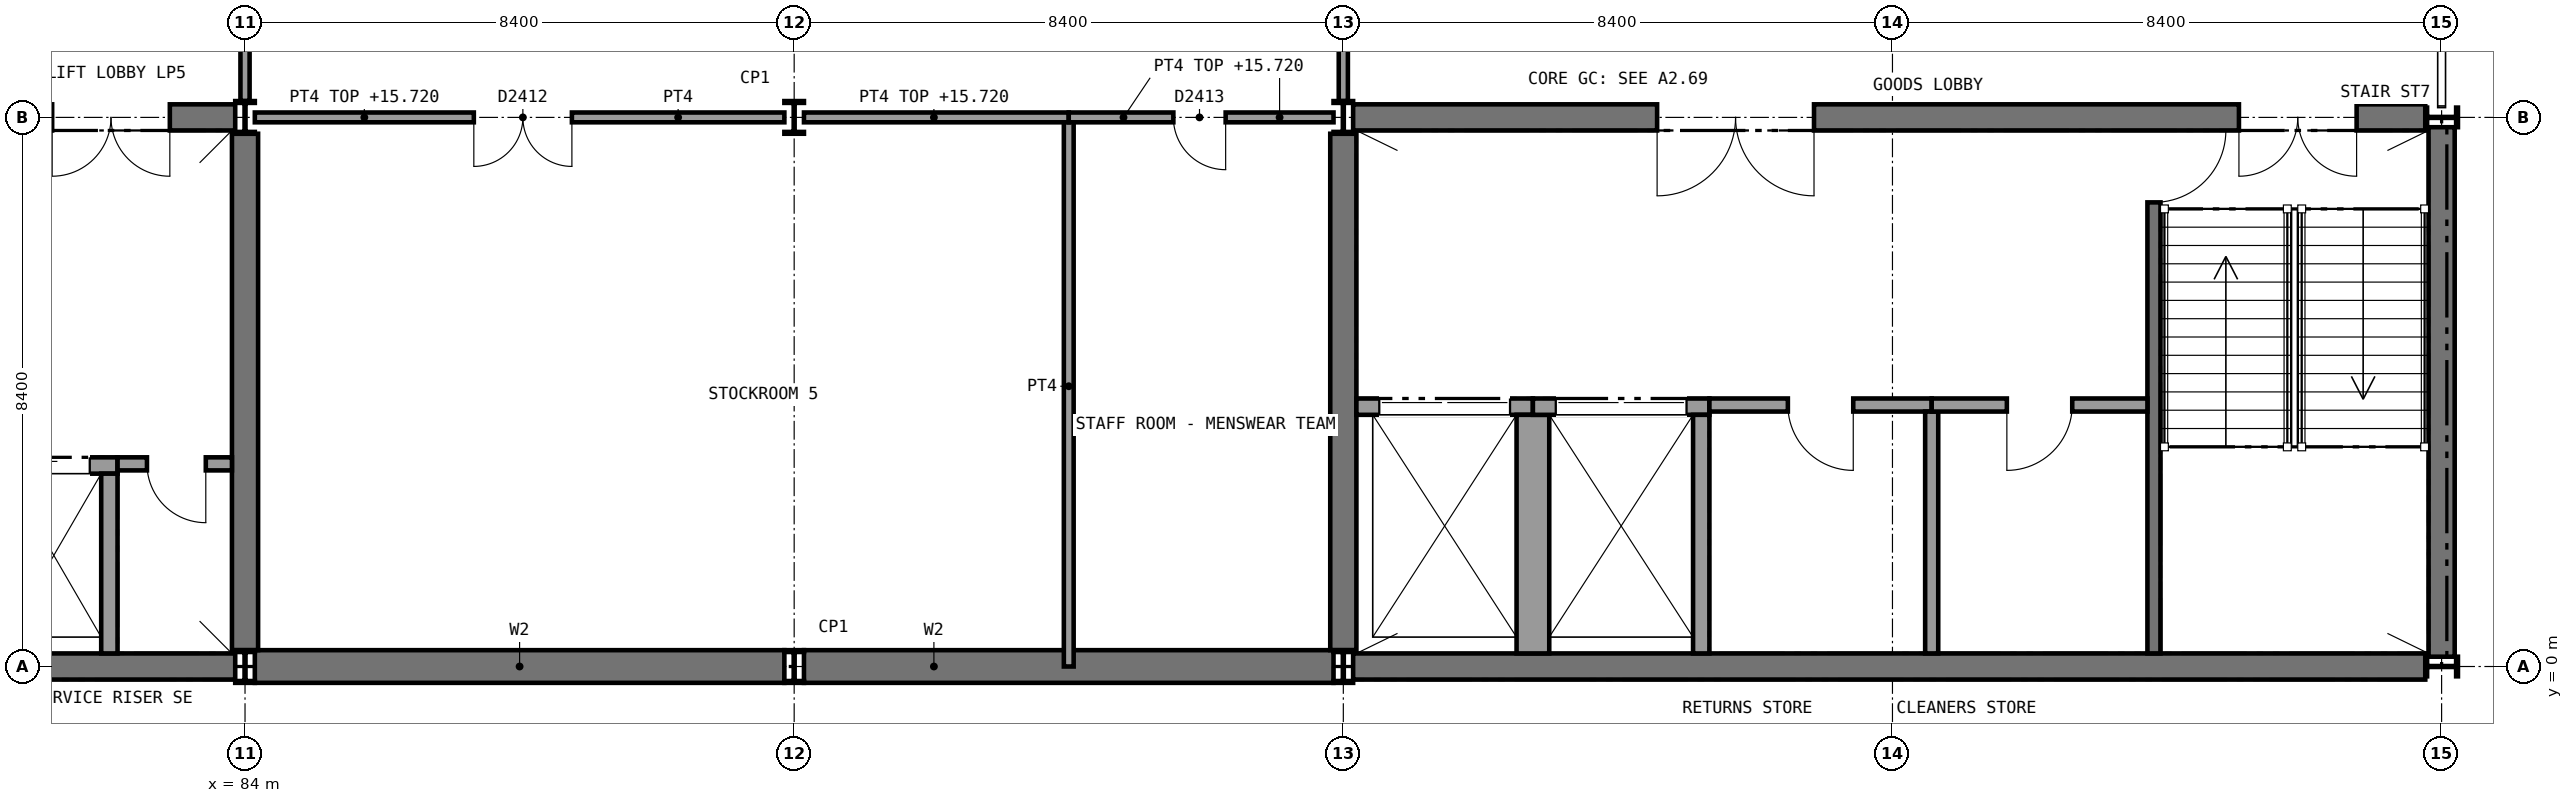
"""IFC4 building model, lengths in metres.
Left out: names, types, materials, properties, quantities, classifications, styles, units other than length and angle.
Written with IfcOpenShell. Run it as: python <this file> out.ifc"""

import sys

from ifc_helpers import new_model, si_unit, direction, frame, frame_2d, origin, origin_2d, place, context, subcontext, project, spatial, rectangle, i_section, extrude, element, fill, save


model = new_model("IFC4")
c1 = context("Model", 3, precision=1e-05, world=origin(), true_north=direction((0.0, 1.0)))
c2 = subcontext(c1, "Body", "Model", "MODEL_VIEW")
j1 = project(units=[si_unit("LENGTHUNIT", "METRE"), si_unit("PLANEANGLEUNIT", "RADIAN")], contexts=[c1])
p1 = place(None, origin())
s1 = spatial("IfcSite", under=j1, at=p1, CompositionType="ELEMENT")
p2 = place(p1, origin())
s2 = spatial("IfcBuilding", under=s1, at=p2, CompositionType="ELEMENT")
p3 = place(p2, frame((0.0, 0.0, 11.4)))
s3 = spatial("IfcBuildingStorey", under=s2, at=p3, CompositionType="ELEMENT", Elevation=11.4)
p4 = place(p3, frame((84.15, 0.0, 0.0), z_axis=(0.0, 0.0, 1.0), x_axis=(1.0, 0.0, 0.0)))
e1 = element("IfcWall", 1, at=p4, inside=s3, PredefinedType="SHEAR", context=c2, shape_type="SweptSolid", body=[
    extrude(rectangle(XDim=8.1, YDim=0.5, at=frame_2d((4.05, 0.0))), origin(), (0.0, 0.0, 1.0), 4.65),
])
p5 = place(p3, frame((92.55, 0.0, 0.0), z_axis=(0.0, 0.0, 1.0), x_axis=(1.0, 0.0, 0.0)))
e2 = element("IfcWall", 2, at=p5, inside=s3, PredefinedType="SHEAR", context=c2, shape_type="SweptSolid", body=[
    extrude(rectangle(XDim=8.1, YDim=0.5, at=frame_2d((4.05, 0.0))), origin(), (0.0, 0.0, 1.0), 4.65),
])
p6 = place(p3, frame((75.75, 0.0, 0.0), z_axis=(0.0, 0.0, 1.0), x_axis=(1.0, 0.0, 0.0)))
e3 = element("IfcWall", 3, at=p6, inside=s3, PredefinedType="SHEAR", context=c2, shape_type="SweptSolid", body=[
    extrude(rectangle(XDim=8.1, YDim=0.4, at=frame_2d((4.05, 0.0))), origin(), (0.0, 0.0, 1.0), 4.65),
])
p7 = place(p3, frame((75.75, 8.4, 0.0), z_axis=(0.0, 0.0, 1.0), x_axis=(1.0, 0.0, 0.0)))
e4 = element("IfcWall", 4, at=p7, inside=s3, PredefinedType="SHEAR", context=c2, shape_type="SweptSolid", body=[
    extrude(rectangle(XDim=8.1, YDim=0.4, at=frame_2d((4.05, 0.0))), origin(), (0.0, 0.0, 1.0), 4.65),
])
p8 = place(p7, frame((1.15, 0.0, 0.0)))
e5 = element("IfcOpeningElement", 5, at=p8, cuts=e4, PredefinedType="OPENING", context=c2, shape_type="SweptSolid", body=[
    extrude(rectangle(XDim=1.8, YDim=2.1, at=frame_2d((0.9, 1.05))), frame((0.0, 0.21, 0.0), z_axis=(0.0, -1.0, 0.0), x_axis=(1.0, 0.0, 0.0)), (0.0, 0.0, 1.0), 0.42),
])
p9 = place(p7, frame((5.3, 0.0, 0.0)))
e6 = element("IfcOpeningElement", 6, at=p9, cuts=e4, PredefinedType="OPENING", context=c2, shape_type="SweptSolid", body=[
    extrude(rectangle(XDim=1.8, YDim=2.1, at=frame_2d((0.9, 1.05))), frame((0.0, 0.21, 0.0), z_axis=(0.0, -1.0, 0.0), x_axis=(1.0, 0.0, 0.0)), (0.0, 0.0, 1.0), 0.42),
])
p10 = place(p3, frame((84.0, 0.25, 0.0), z_axis=(0.0, 0.0, 1.0), x_axis=(0.0, 1.0, 0.0)))
e7 = element("IfcWall", 7, at=p10, inside=s3, PredefinedType="SHEAR", context=c2, shape_type="SweptSolid", body=[
    extrude(rectangle(XDim=7.9, YDim=0.4, at=frame_2d((3.95, 0.0))), origin(), (0.0, 0.0, 1.0), 4.65),
])
p11 = place(p3, frame((100.95, 0.0, 0.0), z_axis=(0.0, 0.0, 1.0), x_axis=(1.0, 0.0, 0.0)))
e8 = element("IfcWall", 8, at=p11, inside=s3, PredefinedType="SHEAR", context=c2, shape_type="SweptSolid", body=[
    extrude(rectangle(XDim=16.4, YDim=0.4, at=frame_2d((8.2, 0.0))), origin(), (0.0, 0.0, 1.0), 4.65),
])
p12 = place(p3, frame((100.95, 8.4, 0.0), z_axis=(0.0, 0.0, 1.0), x_axis=(1.0, 0.0, 0.0)))
e9 = element("IfcWall", 9, at=p12, inside=s3, PredefinedType="SHEAR", context=c2, shape_type="SweptSolid", body=[
    extrude(rectangle(XDim=16.4, YDim=0.4, at=frame_2d((8.2, 0.0))), origin(), (0.0, 0.0, 1.0), 4.65),
])
p13 = place(p12, frame((13.55, 0.0, 0.0)))
e10 = element("IfcOpeningElement", 10, at=p13, cuts=e9, PredefinedType="OPENING", context=c2, shape_type="SweptSolid", body=[
    extrude(rectangle(XDim=1.8, YDim=2.1, at=frame_2d((0.9, 1.05))), frame((0.0, 0.21, 0.0), z_axis=(0.0, -1.0, 0.0), x_axis=(1.0, 0.0, 0.0)), (0.0, 0.0, 1.0), 0.42),
])
p14 = place(p12, frame((4.65, 0.0, 0.0)))
e11 = element("IfcOpeningElement", 11, at=p14, cuts=e9, PredefinedType="OPENING", context=c2, shape_type="SweptSolid", body=[
    extrude(rectangle(XDim=2.4, YDim=2.4, at=frame_2d((1.2, 1.2))), frame((0.0, 0.21, 0.0), z_axis=(0.0, -1.0, 0.0), x_axis=(1.0, 0.0, 0.0)), (0.0, 0.0, 1.0), 0.42),
])
p15 = place(p3, frame((100.8, 0.25, 0.0), z_axis=(0.0, 0.0, 1.0), x_axis=(0.0, 1.0, 0.0)))
e12 = element("IfcWall", 12, at=p15, inside=s3, PredefinedType="SHEAR", context=c2, shape_type="SweptSolid", body=[
    extrude(rectangle(XDim=7.9, YDim=0.4, at=frame_2d((3.95, 0.0))), origin(), (0.0, 0.0, 1.0), 4.65),
])
p16 = place(p3, frame((117.6, 0.15, 0.0), z_axis=(0.0, 0.0, 1.0), x_axis=(0.0, 1.0, 0.0)))
e13 = element("IfcWall", 13, at=p16, inside=s3, PredefinedType="SHEAR", context=c2, shape_type="SweptSolid", body=[
    extrude(rectangle(XDim=8.1, YDim=0.4, at=frame_2d((4.05, 0.0))), origin(), (0.0, 0.0, 1.0), 4.65),
])
for number, where, z_axis, x_axis in (
    (14, (84.0, 0.0, 0.0), (0.0, 0.0, 1.0), (1.0, 0.0, 0.0)),
    (15, (84.0, 8.4, 0.0), (0.0, 0.0, 1.0), (1.0, 0.0, 0.0)),
    (16, (92.4, 0.0, 0.0), (0.0, 0.0, 1.0), (1.0, 0.0, 0.0)),
    (17, (92.4, 8.4, 0.0), (0.0, 0.0, 1.0), (1.0, 0.0, 0.0)),
    (18, (100.8, 0.0, 0.0), (0.0, 0.0, 1.0), (1.0, 0.0, 0.0)),
    (19, (100.8, 8.4, 0.0), (0.0, 0.0, 1.0), (1.0, 0.0, 0.0)),
    (20, (117.6, 0.0, 0.0), (0.0, 0.0, 1.0), (0.0, 1.0, 0.0)),
    (21, (117.6, 8.4, 0.0), (0.0, 0.0, 1.0), (0.0, 1.0, 0.0)),
):
    element("IfcColumn", number, at=place(p3, frame(where, z_axis=z_axis, x_axis=x_axis)), inside=s3, PredefinedType="COLUMN", context=c2, shape_type="SweptSolid", body=[
        extrude(i_section(OverallWidth=0.3, OverallDepth=0.5, WebThickness=0.014, FlangeThickness=0.028, FilletRadius=0.027, at=origin_2d()), origin(), (0.0, 0.0, 1.0), 4.8),
    ])
p17 = place(p3, frame((96.6, 0.0, 0.0), z_axis=(0.0, 0.0, 1.0), x_axis=(0.0, 1.0, 0.0)))
e22 = element("IfcWall", 22, at=p17, inside=s3, PredefinedType="SOLIDWALL", context=c2, shape_type="SweptSolid", body=[
    extrude(rectangle(XDim=8.4, YDim=0.15, at=frame_2d((4.2, 0.0))), origin(), (0.0, 0.0, 1.0), 4.65),
])
p18 = place(p3, frame((84.15, 8.4, 0.0), z_axis=(0.0, 0.0, 1.0), x_axis=(1.0, 0.0, 0.0)))
e23 = element("IfcWall", 23, at=p18, inside=s3, PredefinedType="SOLIDWALL", context=c2, shape_type="SweptSolid", body=[
    extrude(rectangle(XDim=8.1, YDim=0.15, at=frame_2d((4.05, 0.0))), origin(), (0.0, 0.0, 1.0), 4.32),
])
p19 = place(p18, frame((3.35, 0.0, 0.0)))
e24 = element("IfcOpeningElement", 24, at=p19, cuts=e23, PredefinedType="OPENING", context=c2, shape_type="SweptSolid", body=[
    extrude(rectangle(XDim=1.5, YDim=2.1, at=frame_2d((0.75, 1.05))), frame((0.0, 0.085, 0.0), z_axis=(0.0, -1.0, 0.0), x_axis=(1.0, 0.0, 0.0)), (0.0, 0.0, 1.0), 0.17),
])
p20 = place(p3, frame((92.55, 8.4, 0.0), z_axis=(0.0, 0.0, 1.0), x_axis=(1.0, 0.0, 0.0)))
e25 = element("IfcWall", 25, at=p20, inside=s3, PredefinedType="SOLIDWALL", context=c2, shape_type="SweptSolid", body=[
    extrude(rectangle(XDim=4.05, YDim=0.15, at=frame_2d((2.025, 0.0))), origin(), (0.0, 0.0, 1.0), 4.32),
])
p21 = place(p3, frame((96.6, 8.4, 0.0), z_axis=(0.0, 0.0, 1.0), x_axis=(1.0, 0.0, 0.0)))
e26 = element("IfcWall", 26, at=p21, inside=s3, PredefinedType="SOLIDWALL", context=c2, shape_type="SweptSolid", body=[
    extrude(rectangle(XDim=4.05, YDim=0.15, at=frame_2d((2.025, 0.0))), origin(), (0.0, 0.0, 1.0), 4.32),
])
p22 = place(p21, frame((1.6, 0.0, 0.0)))
e27 = element("IfcOpeningElement", 27, at=p22, cuts=e26, PredefinedType="OPENING", context=c2, shape_type="SweptSolid", body=[
    extrude(rectangle(XDim=0.8, YDim=2.1, at=frame_2d((0.4, 1.05))), frame((0.0, 0.085, 0.0), z_axis=(0.0, -1.0, 0.0), x_axis=(1.0, 0.0, 0.0)), (0.0, 0.0, 1.0), 0.17),
])
for number, where, z_axis, x_axis in (
    (28, (84.0, 8.65, 0.0), (0.0, 0.0, 1.0), (0.0, 1.0, 0.0)),
    (29, (100.8, 8.65, 0.0), (0.0, 0.0, 1.0), (0.0, 1.0, 0.0)),
):
    element("IfcWall", number, at=place(p3, frame(where, z_axis=z_axis, x_axis=x_axis)), inside=s3, PredefinedType="PARTITIONING", context=c2, shape_type="SweptSolid", body=[
        extrude(rectangle(XDim=3.1, YDim=0.14, at=frame_2d((1.55, 0.0))), origin(), (0.0, 0.0, 1.0), 4.21),
    ])
p23 = place(p3, frame((80.1, 3.075, 0.0), z_axis=(0.0, 0.0, 1.0), x_axis=(1.0, 0.0, 0.0)))
e30 = element("IfcWall", 30, at=p23, inside=s3, PredefinedType="SOLIDWALL", context=c2, shape_type="SweptSolid", body=[
    extrude(rectangle(XDim=1.95, YDim=0.25, at=frame_2d((0.975, 0.0))), origin(), (0.0, 0.0, 1.0), 4.8),
])
p24 = place(p23, frame((0.425, 0.0, 0.0)))
e31 = element("IfcOpeningElement", 31, at=p24, cuts=e30, PredefinedType="OPENING", context=c2, shape_type="SweptSolid", body=[
    extrude(rectangle(XDim=1.1, YDim=2.1, at=frame_2d((0.55, 1.05))), frame((0.0, 0.135, 0.0), z_axis=(0.0, -1.0, 0.0), x_axis=(1.0, 0.0, 0.0)), (0.0, 0.0, 1.0), 0.27),
])
p25 = place(p3, frame((81.925, 0.2, 0.0), z_axis=(0.0, 0.0, 1.0), x_axis=(0.0, 1.0, 0.0)))
e32 = element("IfcWall", 32, at=p25, inside=s3, PredefinedType="SOLIDWALL", context=c2, shape_type="SweptSolid", body=[
    extrude(rectangle(XDim=2.75, YDim=0.25, at=frame_2d((1.375, 0.0))), origin(), (0.0, 0.0, 1.0), 4.8),
])
p26 = place(p3, frame((82.05, 3.1, 0.0), z_axis=(0.0, 0.0, 1.0), x_axis=(1.0, 0.0, 0.0)))
e33 = element("IfcWall", 33, at=p26, inside=s3, PredefinedType="PARTITIONING", context=c2, shape_type="SweptSolid", body=[
    extrude(rectangle(XDim=1.75, YDim=0.2, at=frame_2d((0.875, 0.0))), origin(), (0.0, 0.0, 1.0), 4.65),
])
p27 = place(p26, frame((0.45, 0.0, 0.0)))
e34 = element("IfcOpeningElement", 34, at=p27, cuts=e33, PredefinedType="OPENING", context=c2, shape_type="SweptSolid", body=[
    extrude(rectangle(XDim=0.9, YDim=2.1, at=frame_2d((0.45, 1.05))), frame((0.0, 0.11, 0.0), z_axis=(0.0, -1.0, 0.0), x_axis=(1.0, 0.0, 0.0)), (0.0, 0.0, 1.0), 0.22),
])
p28 = place(p3, frame((113.2, 0.2, 0.0), z_axis=(0.0, 0.0, 1.0), x_axis=(0.0, 1.0, 0.0)))
e35 = element("IfcWall", 35, at=p28, inside=s3, PredefinedType="SHEAR", context=c2, shape_type="SweptSolid", body=[
    extrude(rectangle(XDim=8.0, YDim=0.2, at=frame_2d((4.0, 0.0))), origin(), (0.0, 0.0, 1.0), 4.65),
])
p29 = place(p28, frame((6.9, 0.0, 0.0)))
e36 = element("IfcOpeningElement", 36, at=p29, cuts=e35, PredefinedType="OPENING", context=c2, shape_type="SweptSolid", body=[
    extrude(rectangle(XDim=1.11, YDim=2.1, at=frame_2d((0.555, 1.05))), frame((0.0, 0.11, 0.0), z_axis=(0.0, -1.0, 0.0), x_axis=(1.0, 0.0, 0.0)), (0.0, 0.0, 1.0), 0.22),
])
p30 = place(p3, frame((101.0, 3.975, 0.0), z_axis=(0.0, 0.0, 1.0), x_axis=(1.0, 0.0, 0.0)))
e37 = element("IfcWall", 37, at=p30, inside=s3, PredefinedType="SOLIDWALL", context=c2, shape_type="SweptSolid", body=[
    extrude(rectangle(XDim=2.7, YDim=0.25, at=frame_2d((1.35, 0.0))), origin(), (0.0, 0.0, 1.0), 4.8),
])
p31 = place(p30, frame((0.35, 0.0, 0.0)))
e38 = element("IfcOpeningElement", 38, at=p31, cuts=e37, PredefinedType="OPENING", context=c2, shape_type="SweptSolid", body=[
    extrude(rectangle(XDim=2.0, YDim=2.2, at=frame_2d((1.0, 1.1))), frame((0.0, 0.135, 0.0), z_axis=(0.0, -1.0, 0.0), x_axis=(1.0, 0.0, 0.0)), (0.0, 0.0, 1.0), 0.27),
])
p32 = place(p3, frame((103.7, 0.2, 0.0), z_axis=(0.0, 0.0, 1.0), x_axis=(0.0, 1.0, 0.0)))
e39 = element("IfcWall", 39, at=p32, inside=s3, PredefinedType="SOLIDWALL", context=c2, shape_type="SweptSolid", body=[
    extrude(rectangle(XDim=3.65, YDim=0.5, at=frame_2d((1.825, 0.0))), origin(), (0.0, 0.0, 1.0), 4.8),
])
p33 = place(p3, frame((103.7, 3.975, 0.0), z_axis=(0.0, 0.0, 1.0), x_axis=(1.0, 0.0, 0.0)))
e40 = element("IfcWall", 40, at=p33, inside=s3, PredefinedType="SOLIDWALL", context=c2, shape_type="SweptSolid", body=[
    extrude(rectangle(XDim=2.7, YDim=0.25, at=frame_2d((1.35, 0.0))), origin(), (0.0, 0.0, 1.0), 4.8),
])
p34 = place(p33, frame((0.35, 0.0, 0.0)))
e41 = element("IfcOpeningElement", 41, at=p34, cuts=e40, PredefinedType="OPENING", context=c2, shape_type="SweptSolid", body=[
    extrude(rectangle(XDim=2.0, YDim=2.2, at=frame_2d((1.0, 1.1))), frame((0.0, 0.135, 0.0), z_axis=(0.0, -1.0, 0.0), x_axis=(1.0, 0.0, 0.0)), (0.0, 0.0, 1.0), 0.27),
])
p35 = place(p3, frame((106.275, 0.2, 0.0), z_axis=(0.0, 0.0, 1.0), x_axis=(0.0, 1.0, 0.0)))
e42 = element("IfcWall", 42, at=p35, inside=s3, PredefinedType="SOLIDWALL", context=c2, shape_type="SweptSolid", body=[
    extrude(rectangle(XDim=3.65, YDim=0.25, at=frame_2d((1.825, 0.0))), origin(), (0.0, 0.0, 1.0), 4.8),
])
p36 = place(p3, frame((106.4, 4.0, 0.0), z_axis=(0.0, 0.0, 1.0), x_axis=(1.0, 0.0, 0.0)))
e43 = element("IfcWall", 43, at=p36, inside=s3, PredefinedType="PARTITIONING", context=c2, shape_type="SweptSolid", body=[
    extrude(rectangle(XDim=3.4, YDim=0.2, at=frame_2d((1.7, 0.0))), origin(), (0.0, 0.0, 1.0), 4.65),
])
p37 = place(p36, frame((1.2, 0.0, 0.0)))
e44 = element("IfcOpeningElement", 44, at=p37, cuts=e43, PredefinedType="OPENING", context=c2, shape_type="SweptSolid", body=[
    extrude(rectangle(XDim=1.0, YDim=2.1, at=frame_2d((0.5, 1.05))), frame((0.0, 0.11, 0.0), z_axis=(0.0, -1.0, 0.0), x_axis=(1.0, 0.0, 0.0)), (0.0, 0.0, 1.0), 0.22),
])
p38 = place(p3, frame((109.8, 0.2, 0.0), z_axis=(0.0, 0.0, 1.0), x_axis=(0.0, 1.0, 0.0)))
e45 = element("IfcWall", 45, at=p38, inside=s3, PredefinedType="PARTITIONING", context=c2, shape_type="SweptSolid", body=[
    extrude(rectangle(XDim=3.7, YDim=0.2, at=frame_2d((1.85, 0.0))), origin(), (0.0, 0.0, 1.0), 4.65),
])
p39 = place(p3, frame((109.8, 4.0, 0.0), z_axis=(0.0, 0.0, 1.0), x_axis=(1.0, 0.0, 0.0)))
e46 = element("IfcWall", 46, at=p39, inside=s3, PredefinedType="PARTITIONING", context=c2, shape_type="SweptSolid", body=[
    extrude(rectangle(XDim=3.3, YDim=0.2, at=frame_2d((1.65, 0.0))), origin(), (0.0, 0.0, 1.0), 4.65),
])
p40 = place(p39, frame((1.15, 0.0, 0.0)))
e47 = element("IfcOpeningElement", 47, at=p40, cuts=e46, PredefinedType="OPENING", context=c2, shape_type="SweptSolid", body=[
    extrude(rectangle(XDim=1.0, YDim=2.1, at=frame_2d((0.5, 1.05))), frame((0.0, 0.11, 0.0), z_axis=(0.0, -1.0, 0.0), x_axis=(1.0, 0.0, 0.0)), (0.0, 0.0, 1.0), 0.22),
])
p41 = place(p19, frame((1.5, 0.0, 0.0), z_axis=(0.0, 0.0, 1.0), x_axis=(-1.0, 0.0, 0.0)))
e48 = element("IfcDoor", 48, at=p41, inside=s3, OperationType="DOUBLE_DOOR_SINGLE_SWING", PredefinedType="DOOR", context=c2, shape_type="SweptSolid", body=[
    extrude(rectangle(XDim=1.5, YDim=2.1, at=frame_2d((0.75, 1.05))), frame((0.0, 0.025, 0.0), z_axis=(0.0, -1.0, 0.0), x_axis=(1.0, 0.0, 0.0)), (0.0, 0.0, 1.0), 0.05),
])
fill(e24, e48)
p42 = place(p22, frame((0.8, 0.0, 0.0), z_axis=(0.0, 0.0, 1.0), x_axis=(-1.0, 0.0, 0.0)))
e49 = element("IfcDoor", 49, at=p42, inside=s3, OperationType="SINGLE_SWING_LEFT", PredefinedType="DOOR", context=c2, shape_type="SweptSolid", body=[
    extrude(rectangle(XDim=0.8, YDim=2.1, at=frame_2d((0.4, 1.05))), frame((0.0, 0.025, 0.0), z_axis=(0.0, -1.0, 0.0), x_axis=(1.0, 0.0, 0.0)), (0.0, 0.0, 1.0), 0.05),
])
fill(e27, e49)
p43 = place(p24, origin())
e50 = element("IfcDoor", 50, at=p43, inside=s3, OperationType="SLIDING_TO_LEFT", PredefinedType="DOOR", context=c2, shape_type="SweptSolid", body=[
    extrude(rectangle(XDim=1.1, YDim=2.1, at=frame_2d((0.55, 1.05))), frame((0.0, 0.025, 0.0), z_axis=(0.0, -1.0, 0.0), x_axis=(1.0, 0.0, 0.0)), (0.0, 0.0, 1.0), 0.05),
])
fill(e31, e50)
p44 = place(p27, frame((0.9, 0.0, 0.0), z_axis=(0.0, 0.0, 1.0), x_axis=(-1.0, 0.0, 0.0)))
e51 = element("IfcDoor", 51, at=p44, inside=s3, OperationType="SINGLE_SWING_LEFT", PredefinedType="DOOR", context=c2, shape_type="SweptSolid", body=[
    extrude(rectangle(XDim=0.9, YDim=2.1, at=frame_2d((0.45, 1.05))), frame((0.0, 0.025, 0.0), z_axis=(0.0, -1.0, 0.0), x_axis=(1.0, 0.0, 0.0)), (0.0, 0.0, 1.0), 0.05),
])
fill(e34, e51)
p45 = place(p9, frame((1.8, 0.0, 0.0), z_axis=(0.0, 0.0, 1.0), x_axis=(-1.0, 0.0, 0.0)))
e52 = element("IfcDoor", 52, at=p45, inside=s3, OperationType="DOUBLE_DOOR_SINGLE_SWING", PredefinedType="DOOR", context=c2, shape_type="SweptSolid", body=[
    extrude(rectangle(XDim=1.8, YDim=2.1, at=frame_2d((0.9, 1.05))), frame((0.0, 0.025, 0.0), z_axis=(0.0, -1.0, 0.0), x_axis=(1.0, 0.0, 0.0)), (0.0, 0.0, 1.0), 0.05),
])
fill(e6, e52)
p46 = place(p29, frame((1.1, 0.0, 0.0), z_axis=(0.0, 0.0, 1.0), x_axis=(-1.0, 0.0, 0.0)))
e53 = element("IfcDoor", 53, at=p46, inside=s3, OperationType="SINGLE_SWING_LEFT", PredefinedType="DOOR", context=c2, shape_type="SweptSolid", body=[
    extrude(rectangle(XDim=1.1, YDim=2.1, at=frame_2d((0.55, 1.05))), frame((0.0, 0.025, 0.0), z_axis=(0.0, -1.0, 0.0), x_axis=(1.0, 0.0, 0.0)), (0.0, 0.0, 1.0), 0.05),
])
fill(e36, e53)
p47 = place(p31, origin())
e54 = element("IfcDoor", 54, at=p47, inside=s3, OperationType="DOUBLE_DOOR_SLIDING", PredefinedType="DOOR", context=c2, shape_type="SweptSolid", body=[
    extrude(rectangle(XDim=2.0, YDim=2.2, at=frame_2d((1.0, 1.1))), frame((0.0, 0.025, 0.0), z_axis=(0.0, -1.0, 0.0), x_axis=(1.0, 0.0, 0.0)), (0.0, 0.0, 1.0), 0.05),
])
fill(e38, e54)
p48 = place(p34, origin())
e55 = element("IfcDoor", 55, at=p48, inside=s3, OperationType="DOUBLE_DOOR_SLIDING", PredefinedType="DOOR", context=c2, shape_type="SweptSolid", body=[
    extrude(rectangle(XDim=2.0, YDim=2.2, at=frame_2d((1.0, 1.1))), frame((0.0, 0.025, 0.0), z_axis=(0.0, -1.0, 0.0), x_axis=(1.0, 0.0, 0.0)), (0.0, 0.0, 1.0), 0.05),
])
fill(e41, e55)
p49 = place(p37, frame((1.0, 0.0, 0.0), z_axis=(0.0, 0.0, 1.0), x_axis=(-1.0, 0.0, 0.0)))
e56 = element("IfcDoor", 56, at=p49, inside=s3, OperationType="SINGLE_SWING_LEFT", PredefinedType="DOOR", context=c2, shape_type="SweptSolid", body=[
    extrude(rectangle(XDim=1.0, YDim=2.1, at=frame_2d((0.5, 1.05))), frame((0.0, 0.025, 0.0), z_axis=(0.0, -1.0, 0.0), x_axis=(1.0, 0.0, 0.0)), (0.0, 0.0, 1.0), 0.05),
])
fill(e44, e56)
p50 = place(p40, frame((1.0, 0.0, 0.0), z_axis=(0.0, 0.0, 1.0), x_axis=(-1.0, 0.0, 0.0)))
e57 = element("IfcDoor", 57, at=p50, inside=s3, OperationType="SINGLE_SWING_RIGHT", PredefinedType="DOOR", context=c2, shape_type="SweptSolid", body=[
    extrude(rectangle(XDim=1.0, YDim=2.1, at=frame_2d((0.5, 1.05))), frame((0.0, 0.025, 0.0), z_axis=(0.0, -1.0, 0.0), x_axis=(1.0, 0.0, 0.0)), (0.0, 0.0, 1.0), 0.05),
])
fill(e47, e57)
p51 = place(p13, frame((1.8, 0.0, 0.0), z_axis=(0.0, 0.0, 1.0), x_axis=(-1.0, 0.0, 0.0)))
e58 = element("IfcDoor", 58, at=p51, inside=s3, OperationType="DOUBLE_DOOR_SINGLE_SWING", PredefinedType="DOOR", context=c2, shape_type="SweptSolid", body=[
    extrude(rectangle(XDim=1.8, YDim=2.1, at=frame_2d((0.9, 1.05))), frame((0.0, 0.025, 0.0), z_axis=(0.0, -1.0, 0.0), x_axis=(1.0, 0.0, 0.0)), (0.0, 0.0, 1.0), 0.05),
])
fill(e10, e58)
p52 = place(p14, frame((2.4, 0.0, 0.0), z_axis=(0.0, 0.0, 1.0), x_axis=(-1.0, 0.0, 0.0)))
e59 = element("IfcDoor", 59, at=p52, inside=s3, OperationType="DOUBLE_DOOR_SINGLE_SWING", PredefinedType="DOOR", context=c2, shape_type="SweptSolid", body=[
    extrude(rectangle(XDim=2.4, YDim=2.4, at=frame_2d((1.2, 1.2))), frame((0.0, 0.025, 0.0), z_axis=(0.0, -1.0, 0.0), x_axis=(1.0, 0.0, 0.0)), (0.0, 0.0, 1.0), 0.05),
])
fill(e11, e59)
save(model, sys.argv[1])
